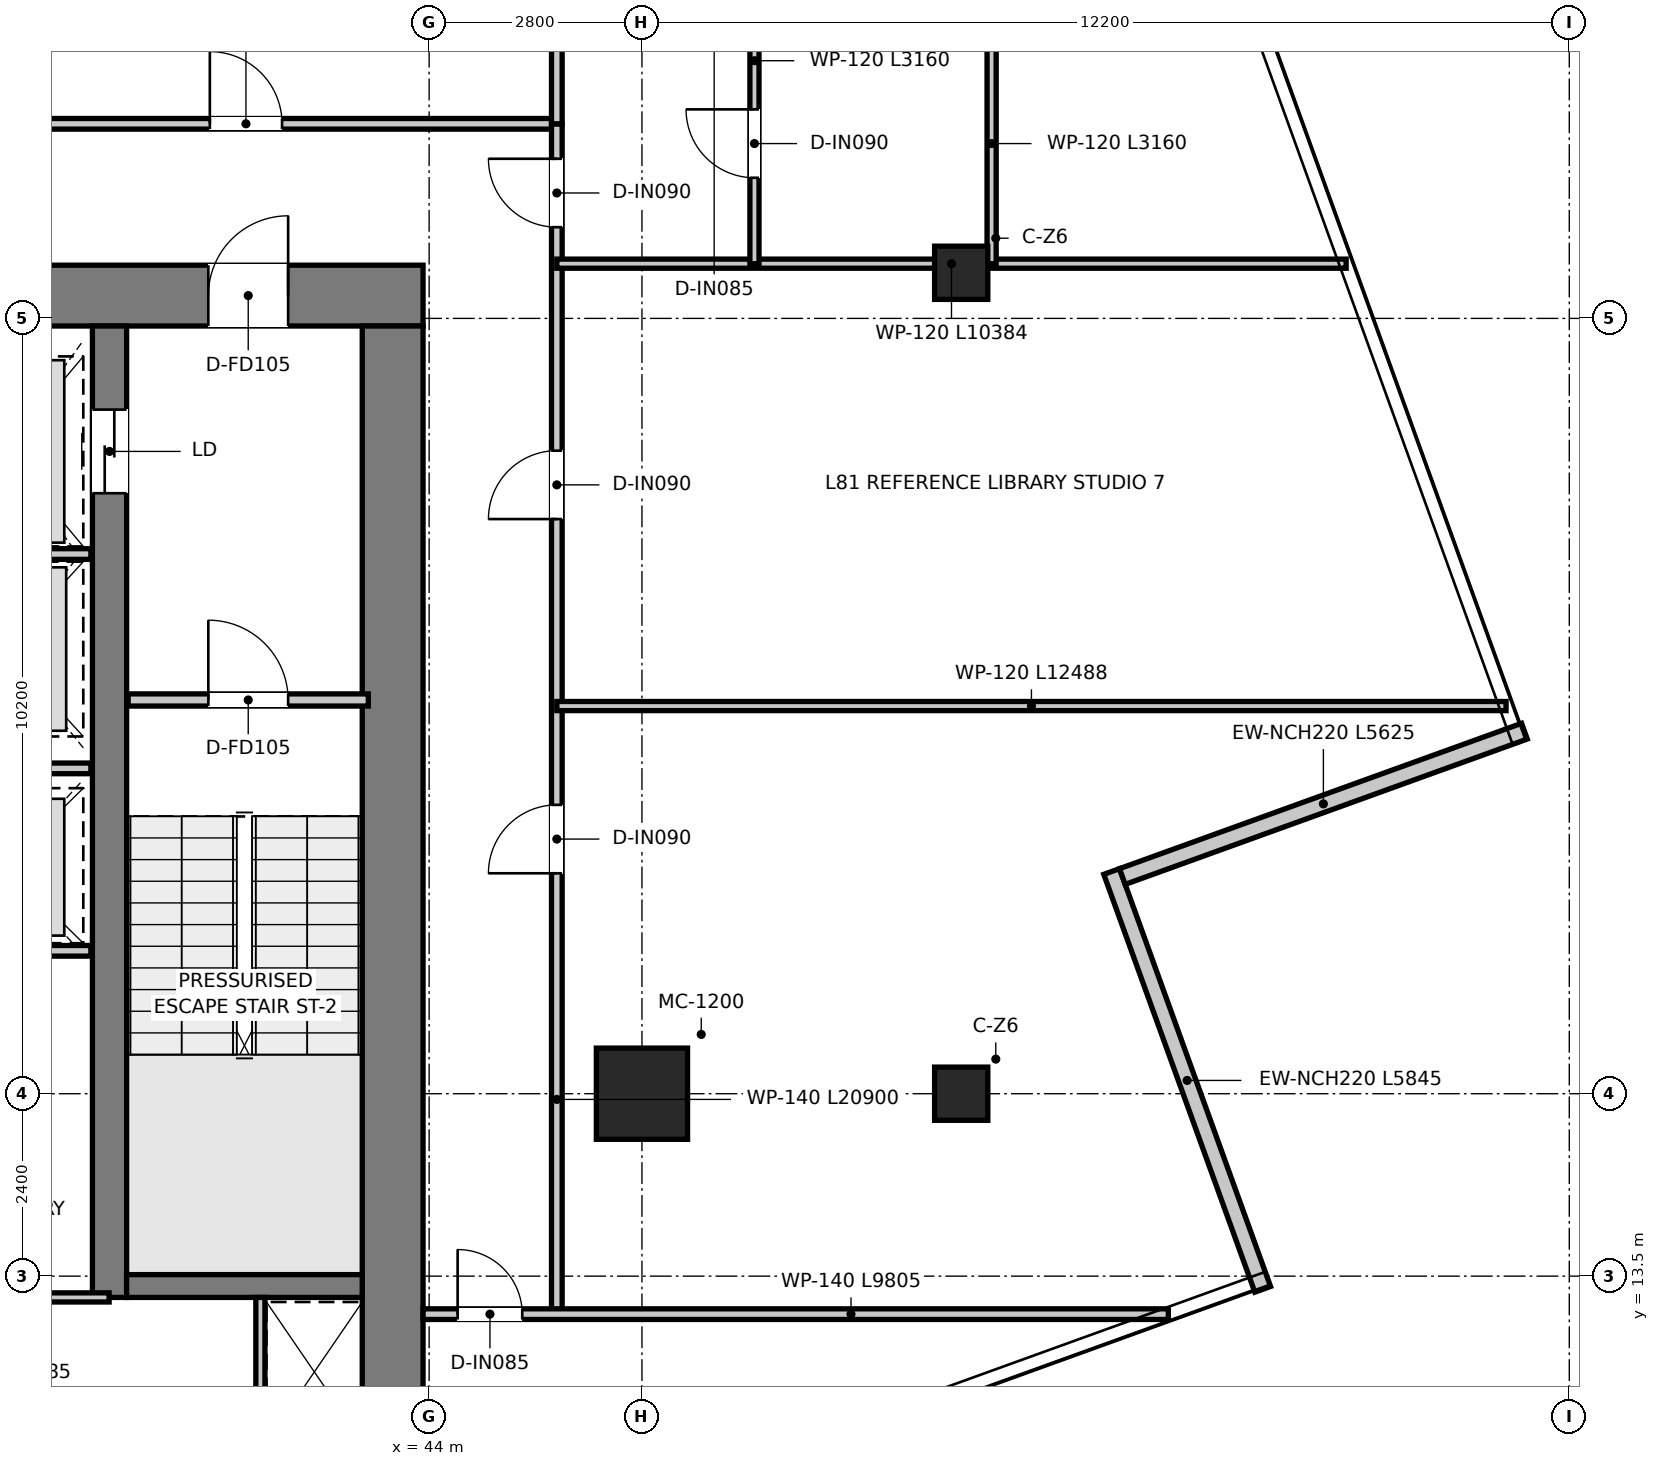
"""IFC4 building model, lengths in metres.
Left out: names, types, materials, properties, quantities, classifications, styles, units other than length and angle.
Written with IfcOpenShell. Run it as: python <this file> out.ifc"""

import sys

from ifc_helpers import new_model, si_unit, direction, frame, frame_2d, origin, origin_2d, place, context, subcontext, project, spatial, rectangle, extrude, source, transform, mapped, element, fill, save


model = new_model("IFC4")
c1 = context("Model", 3, precision=1e-05, world=origin(), true_north=direction((0.0, 1.0)))
c2 = subcontext(c1, "Body", "Model", "MODEL_VIEW")
j1 = project(units=[si_unit("LENGTHUNIT", "METRE"), si_unit("PLANEANGLEUNIT", "RADIAN")], contexts=[c1])
p1 = place(None, origin())
s1 = spatial("IfcSite", under=j1, at=p1, CompositionType="ELEMENT")
p2 = place(p1, origin())
s2 = spatial("IfcBuilding", under=s1, at=p2, CompositionType="ELEMENT")
p3 = place(p2, frame((0.0, 0.0, 331.65)))
s3 = spatial("IfcBuildingStorey", under=s2, at=p3, CompositionType="ELEMENT", Elevation=331.65)
p4 = place(p3, frame((28.08, 26.4, 0.0), z_axis=(0.0, 0.0, 1.0), x_axis=(1.0, 0.0, 0.0)))
e1 = element("IfcWall", 1, at=p4, inside=s3, PredefinedType="SHEAR", context=c2, shape_type="SweptSolid", body=[
    extrude(rectangle(XDim=15.84, YDim=0.8, at=frame_2d((7.92, 0.0))), origin(), (0.0, 0.0, 1.0), 3.95),
])
p5 = place(p4, frame((7.22, 0.0, 0.0)))
e2 = element("IfcOpeningElement", 2, at=p5, cuts=e1, PredefinedType="OPENING", context=c2, shape_type="SweptSolid", body=[
    extrude(rectangle(XDim=1.4, YDim=2.2, at=frame_2d((0.7, 1.1))), frame((0.0, 0.41, 0.0), z_axis=(0.0, -1.0, 0.0), x_axis=(1.0, 0.0, 0.0)), (0.0, 0.0, 1.0), 0.82),
])
p6 = place(p4, frame((1.775, 0.0, 0.0)))
e3 = element("IfcOpeningElement", 3, at=p6, cuts=e1, PredefinedType="OPENING", context=c2, shape_type="SweptSolid", body=[
    extrude(rectangle(XDim=1.05, YDim=2.1, at=frame_2d((0.525, 1.05))), frame((0.0, 0.41, 0.0), z_axis=(0.0, -1.0, 0.0), x_axis=(1.0, 0.0, 0.0)), (0.0, 0.0, 1.0), 0.82),
])
p7 = place(p4, frame((13.015, 0.0, 0.0)))
e4 = element("IfcOpeningElement", 4, at=p7, cuts=e1, PredefinedType="OPENING", context=c2, shape_type="SweptSolid", body=[
    extrude(rectangle(XDim=1.05, YDim=2.1, at=frame_2d((0.525, 1.05))), frame((0.0, 0.41, 0.0), z_axis=(0.0, -1.0, 0.0), x_axis=(1.0, 0.0, 0.0)), (0.0, 0.0, 1.0), 0.82),
])
p8 = place(p3, frame((43.52, 11.3, 0.0), z_axis=(0.0, 0.0, 1.0), x_axis=(0.0, 1.0, 0.0)))
e5 = element("IfcWall", 5, at=p8, inside=s3, PredefinedType="SHEAR", context=c2, shape_type="SweptSolid", body=[
    extrude(rectangle(XDim=14.7, YDim=0.8, at=frame_2d((7.35, 0.0))), origin(), (0.0, 0.0, 1.0), 3.95),
])
p9 = place(p3, frame((39.795, 13.22, 0.0), z_axis=(0.0, 0.0, 1.0), x_axis=(0.0, 1.0, 0.0)))
e6 = element("IfcWall", 6, at=p9, inside=s3, PredefinedType="SHEAR", context=c2, shape_type="SweptSolid", body=[
    extrude(rectangle(XDim=12.78, YDim=0.45, at=frame_2d((6.39, 0.0))), origin(), (0.0, 0.0, 1.0), 3.95),
])
p10 = place(p9, frame((10.58, 0.0, 0.0)))
e7 = element("IfcOpeningElement", 7, at=p10, cuts=e6, PredefinedType="OPENING", context=c2, shape_type="SweptSolid", body=[
    extrude(rectangle(XDim=1.1, YDim=2.15, at=frame_2d((0.55, 1.075))), frame((0.0, 0.235, 0.0), z_axis=(0.0, -1.0, 0.0), x_axis=(1.0, 0.0, 0.0)), (0.0, 0.0, 1.0), 0.47),
])
p11 = place(p3, frame((40.02, 13.37, 0.0), z_axis=(0.0, 0.0, 1.0), x_axis=(1.0, 0.0, 0.0)))
e8 = element("IfcWall", 8, at=p11, inside=s3, PredefinedType="SHEAR", context=c2, shape_type="SweptSolid", body=[
    extrude(rectangle(XDim=3.1, YDim=0.3, at=frame_2d((1.55, 0.0))), origin(), (0.0, 0.0, 1.0), 3.95),
])
m1 = source(origin(), c2, "Body", "SweptSolid", [
    extrude(rectangle(XDim=1.2, YDim=1.2, at=origin_2d()), origin(), (0.0, 0.0, 1.0), 3.95),
])
p12 = place(p3, frame((46.8, 15.9, 0.0), z_axis=(0.0, 0.0, 1.0), x_axis=(1.0, 0.0, 0.0)))
e9 = element("IfcColumn", 9, at=p12, inside=s3, PredefinedType="USERDEFINED", context=c2, shape_type="MappedRepresentation", body=[
    mapped(m1, transform((0.0, 0.0, 0.0), x_axis=(1.0, 0.0, 0.0), y_axis=(0.0, 1.0, 0.0), z_axis=(0.0, 0.0, 1.0), scale=1.0)),
])
m2 = source(origin(), c2, "Body", "SweptSolid", [
    extrude(rectangle(XDim=0.7, YDim=0.7, at=origin_2d()), origin(), (0.0, 0.0, 1.0), 3.95),
])
for number, where, z_axis, x_axis in (
    (10, (51.0, 26.7, 0.0), (0.0, 0.0, 1.0), (1.0, 0.0, 0.0)),
    (11, (51.0, 15.9, 0.0), (0.0, 0.0, 1.0), (1.0, 0.0, 0.0)),
):
    element("IfcColumn", number, at=place(p3, frame(where, z_axis=z_axis, x_axis=x_axis)), inside=s3, PredefinedType="COLUMN", context=c2, shape_type="MappedRepresentation", body=[
        mapped(m2, transform((0.0, 0.0, 0.0), x_axis=(1.0, 0.0, 0.0), y_axis=(0.0, 1.0, 0.0), z_axis=(0.0, 0.0, 1.0), scale=1.0)),
    ])
p13 = place(p3, frame((54.966, 13.326, 0.0), z_axis=(0.0, 0.0, 1.0), x_axis=(-0.339961607222, 0.940439315222, 0.0)))
e12 = element("IfcWall", 12, at=p13, inside=s3, PredefinedType="ELEMENTEDWALL", context=c2, shape_type="SweptSolid", body=[
    extrude(rectangle(XDim=5.845, YDim=0.22, at=frame_2d((2.922, 0.0))), origin(), (0.0, 0.0, 1.0), 3.67),
])
p14 = place(p3, frame((53.12, 18.757, 0.0), z_axis=(0.0, 0.0, 1.0), x_axis=(0.940431745156, 0.339982547644, 0.0)))
e13 = element("IfcWall", 13, at=p14, inside=s3, PredefinedType="ELEMENTEDWALL", context=c2, shape_type="SweptSolid", body=[
    extrude(rectangle(XDim=5.625, YDim=0.22, at=frame_2d((2.812, 0.0))), origin(), (0.0, 0.0, 1.0), 3.67),
])
p15 = place(p3, frame((40.04, 21.08, 0.0), z_axis=(0.0, 0.0, 1.0), x_axis=(1.0, 0.0, 0.0)))
e14 = element("IfcWall", 14, at=p15, inside=s3, PredefinedType="PARTITIONING", context=c2, shape_type="SweptSolid", body=[
    extrude(rectangle(XDim=3.16, YDim=0.16, at=frame_2d((1.58, 0.0))), origin(), (0.0, 0.0, 1.0), 3.67),
])
p16 = place(p15, frame((1.055, 0.0, 0.0)))
e15 = element("IfcOpeningElement", 15, at=p16, cuts=e14, PredefinedType="OPENING", context=c2, shape_type="SweptSolid", body=[
    extrude(rectangle(XDim=1.05, YDim=2.1, at=frame_2d((0.525, 1.05))), frame((0.0, 0.09, 0.0), z_axis=(0.0, -1.0, 0.0), x_axis=(1.0, 0.0, 0.0)), (0.0, 0.0, 1.0), 0.18),
])
p17 = place(p3, frame((37.28, 23.0, 0.0), z_axis=(0.0, 0.0, 1.0), x_axis=(1.0, 0.0, 0.0)))
e16 = element("IfcWall", 16, at=p17, inside=s3, PredefinedType="PARTITIONING", context=c2, shape_type="SweptSolid", body=[
    extrude(rectangle(XDim=2.27, YDim=0.14, at=frame_2d((1.135, 0.0))), origin(), (0.0, 0.0, 1.0), 2.82),
])
for number, where, z_axis, x_axis in (
    (17, (37.28, 17.78, 0.0), (0.0, 0.0, 1.0), (1.0, 0.0, 0.0)),
    (18, (37.28, 20.18, 0.0), (0.0, 0.0, 1.0), (1.0, 0.0, 0.0)),
):
    element("IfcWall", number, at=place(p3, frame(where, z_axis=z_axis, x_axis=x_axis)), inside=s3, PredefinedType="PARTITIONING", context=c2, shape_type="SweptSolid", body=[
        extrude(rectangle(XDim=2.27, YDim=0.14, at=frame_2d((1.135, 0.0))), origin(), (0.0, 0.0, 1.0), 3.67),
    ])
p18 = place(p3, frame((41.78, 11.25, 0.0), z_axis=(0.0, 0.0, 1.0), x_axis=(0.0, 1.0, 0.0)))
e19 = element("IfcWall", 19, at=p18, inside=s3, PredefinedType="PARTITIONING", context=c2, shape_type="SweptSolid", body=[
    extrude(rectangle(XDim=1.97, YDim=0.12, at=frame_2d((0.985, 0.0))), origin(), (0.0, 0.0, 1.0), 3.67),
])
p19 = place(p3, frame((32.21, 13.22, 0.0), z_axis=(0.0, 0.0, 1.0), x_axis=(1.0, 0.0, 0.0)))
e20 = element("IfcWall", 20, at=p19, inside=s3, PredefinedType="PARTITIONING", context=c2, shape_type="SweptSolid", body=[
    extrude(rectangle(XDim=7.58, YDim=0.12, at=frame_2d((3.79, 0.0))), origin(), (0.0, 0.0, 1.0), 3.67),
])
p20 = place(p19, frame((3.365, 0.0, 0.0)))
e21 = element("IfcOpeningElement", 21, at=p20, cuts=e20, PredefinedType="OPENING", context=c2, shape_type="SweptSolid", body=[
    extrude(rectangle(XDim=0.85, YDim=2.1, at=frame_2d((0.425, 1.05))), frame((0.0, 0.07, 0.0), z_axis=(0.0, -1.0, 0.0), x_axis=(1.0, 0.0, 0.0)), (0.0, 0.0, 1.0), 0.14),
])
p21 = place(p3, frame((26.32, 28.66, 0.0), z_axis=(0.0, 0.0, 1.0), x_axis=(1.0, 0.0, 0.0)))
e22 = element("IfcWall", 22, at=p21, inside=s3, PredefinedType="PARTITIONING", context=c2, shape_type="SweptSolid", body=[
    extrude(rectangle(XDim=19.36, YDim=0.14, at=frame_2d((9.68, 0.0))), origin(), (0.0, 0.0, 1.0), 3.18),
])
p22 = place(p21, frame((5.115, 0.0, 0.0)))
e23 = element("IfcOpeningElement", 23, at=p22, cuts=e22, PredefinedType="OPENING", context=c2, shape_type="SweptSolid", body=[
    extrude(rectangle(XDim=0.95, YDim=2.1, at=frame_2d((0.475, 1.05))), frame((0.0, 0.08, 0.0), z_axis=(0.0, -1.0, 0.0), x_axis=(1.0, 0.0, 0.0)), (0.0, 0.0, 1.0), 0.16),
])
p23 = place(p21, frame((14.795, 0.0, 0.0)))
e24 = element("IfcOpeningElement", 24, at=p23, cuts=e22, PredefinedType="OPENING", context=c2, shape_type="SweptSolid", body=[
    extrude(rectangle(XDim=0.95, YDim=2.1, at=frame_2d((0.475, 1.05))), frame((0.0, 0.08, 0.0), z_axis=(0.0, -1.0, 0.0), x_axis=(1.0, 0.0, 0.0)), (0.0, 0.0, 1.0), 0.16),
])
p24 = place(p3, frame((45.68, 13.0, 0.0), z_axis=(0.0, 0.0, 1.0), x_axis=(0.0, 1.0, 0.0)))
e25 = element("IfcWall", 25, at=p24, inside=s3, PredefinedType="PARTITIONING", context=c2, shape_type="SweptSolid", body=[
    extrude(rectangle(XDim=15.66, YDim=0.14, at=frame_2d((7.83, 0.0))), origin(), (0.0, 0.0, 1.0), 3.13),
])
p25 = place(p24, frame((14.3, 0.0, 0.0)))
e26 = element("IfcOpeningElement", 26, at=p25, cuts=e25, PredefinedType="OPENING", context=c2, shape_type="SweptSolid", body=[
    extrude(rectangle(XDim=0.9, YDim=2.1, at=frame_2d((0.45, 1.05))), frame((0.0, 0.08, 0.0), z_axis=(0.0, -1.0, 0.0), x_axis=(1.0, 0.0, 0.0)), (0.0, 0.0, 1.0), 0.16),
])
p26 = place(p24, frame((5.8, 0.0, 0.0)))
e27 = element("IfcOpeningElement", 27, at=p26, cuts=e25, PredefinedType="OPENING", context=c2, shape_type="SweptSolid", body=[
    extrude(rectangle(XDim=0.9, YDim=2.1, at=frame_2d((0.45, 1.05))), frame((0.0, 0.08, 0.0), z_axis=(0.0, -1.0, 0.0), x_axis=(1.0, 0.0, 0.0)), (0.0, 0.0, 1.0), 0.16),
])
p27 = place(p24, frame((10.46, 0.0, 0.0)))
e28 = element("IfcOpeningElement", 28, at=p27, cuts=e25, PredefinedType="OPENING", context=c2, shape_type="SweptSolid", body=[
    extrude(rectangle(XDim=0.9, YDim=2.1, at=frame_2d((0.45, 1.05))), frame((0.0, 0.08, 0.0), z_axis=(0.0, -1.0, 0.0), x_axis=(1.0, 0.0, 0.0)), (0.0, 0.0, 1.0), 0.16),
])
p28 = place(p3, frame((43.92, 13.0, 0.0), z_axis=(0.0, 0.0, 1.0), x_axis=(1.0, 0.0, 0.0)))
e29 = element("IfcWall", 29, at=p28, inside=s3, PredefinedType="PARTITIONING", context=c2, shape_type="SweptSolid", body=[
    extrude(rectangle(XDim=9.805, YDim=0.14, at=frame_2d((4.903, 0.0))), origin(), (0.0, 0.0, 1.0), 3.18),
])
p29 = place(p28, frame((0.455, 0.0, 0.0)))
e30 = element("IfcOpeningElement", 30, at=p29, cuts=e29, PredefinedType="OPENING", context=c2, shape_type="SweptSolid", body=[
    extrude(rectangle(XDim=0.85, YDim=2.1, at=frame_2d((0.425, 1.05))), frame((0.0, 0.08, 0.0), z_axis=(0.0, -1.0, 0.0), x_axis=(1.0, 0.0, 0.0)), (0.0, 0.0, 1.0), 0.16),
])
p30 = place(p3, frame((45.68, 26.82, 0.0), z_axis=(0.0, 0.0, 1.0), x_axis=(1.0, 0.0, 0.0)))
e31 = element("IfcWall", 31, at=p30, inside=s3, PredefinedType="PARTITIONING", context=c2, shape_type="SweptSolid", body=[
    extrude(rectangle(XDim=10.384, YDim=0.12, at=frame_2d((5.192, 0.0))), origin(), (0.0, 0.0, 1.0), 3.13),
])
p31 = place(p3, frame((51.4, 26.82, 0.0), z_axis=(0.0, 0.0, 1.0), x_axis=(0.0, 1.0, 0.0)))
e32 = element("IfcWall", 32, at=p31, inside=s3, PredefinedType="PARTITIONING", context=c2, shape_type="SweptSolid", body=[
    extrude(rectangle(XDim=3.16, YDim=0.12, at=frame_2d((1.58, 0.0))), origin(), (0.0, 0.0, 1.0), 3.67),
])
p32 = place(p3, frame((48.28, 26.82, 0.0), z_axis=(0.0, 0.0, 1.0), x_axis=(0.0, 1.0, 0.0)))
e33 = element("IfcWall", 33, at=p32, inside=s3, PredefinedType="PARTITIONING", context=c2, shape_type="SweptSolid", body=[
    extrude(rectangle(XDim=3.16, YDim=0.12, at=frame_2d((1.58, 0.0))), origin(), (0.0, 0.0, 1.0), 3.18),
])
p33 = place(p32, frame((1.13, 0.0, 0.0)))
e34 = element("IfcOpeningElement", 34, at=p33, cuts=e33, PredefinedType="OPENING", context=c2, shape_type="SweptSolid", body=[
    extrude(rectangle(XDim=0.9, YDim=2.1, at=frame_2d((0.45, 1.05))), frame((0.0, 0.07, 0.0), z_axis=(0.0, -1.0, 0.0), x_axis=(1.0, 0.0, 0.0)), (0.0, 0.0, 1.0), 0.14),
])
p34 = place(p3, frame((45.68, 28.66, 0.0), z_axis=(0.0, 0.0, 1.0), x_axis=(0.0, 1.0, 0.0)))
e35 = element("IfcWall", 35, at=p34, inside=s3, PredefinedType="PARTITIONING", context=c2, shape_type="SweptSolid", body=[
    extrude(rectangle(XDim=5.24, YDim=0.14, at=frame_2d((2.62, 0.0))), origin(), (0.0, 0.0, 1.0), 3.43),
])
p35 = place(p3, frame((45.68, 21.0, 0.0), z_axis=(0.0, 0.0, 1.0), x_axis=(1.0, 0.0, 0.0)))
e36 = element("IfcWall", 36, at=p35, inside=s3, PredefinedType="PARTITIONING", context=c2, shape_type="SweptSolid", body=[
    extrude(rectangle(XDim=12.488, YDim=0.12, at=frame_2d((6.244, 0.0))), origin(), (0.0, 0.0, 1.0), 3.13),
])
p36 = place(p16, origin())
e37 = element("IfcDoor", 37, at=p36, inside=s3, OperationType="SINGLE_SWING_LEFT", PredefinedType="DOOR", context=c2, shape_type="SweptSolid", body=[
    extrude(rectangle(XDim=1.05, YDim=2.1, at=frame_2d((0.525, 1.05))), frame((0.0, 0.025, 0.0), z_axis=(0.0, -1.0, 0.0), x_axis=(1.0, 0.0, 0.0)), (0.0, 0.0, 1.0), 0.05),
])
fill(e15, e37)
p37 = place(p7, origin())
e38 = element("IfcDoor", 38, at=p37, inside=s3, OperationType="SINGLE_SWING_RIGHT", PredefinedType="DOOR", context=c2, shape_type="SweptSolid", body=[
    extrude(rectangle(XDim=1.05, YDim=2.1, at=frame_2d((0.525, 1.05))), frame((0.0, 0.025, 0.0), z_axis=(0.0, -1.0, 0.0), x_axis=(1.0, 0.0, 0.0)), (0.0, 0.0, 1.0), 0.05),
])
fill(e4, e38)
p38 = place(p10, origin())
e39 = element("IfcDoor", 39, at=p38, inside=s3, OperationType="DOUBLE_DOOR_SLIDING", PredefinedType="DOOR", context=c2, shape_type="SweptSolid", body=[
    extrude(rectangle(XDim=1.1, YDim=2.15, at=frame_2d((0.55, 1.075))), frame((0.0, 0.025, 0.0), z_axis=(0.0, -1.0, 0.0), x_axis=(1.0, 0.0, 0.0)), (0.0, 0.0, 1.0), 0.05),
])
fill(e7, e39)
p39 = place(p25, origin())
e40 = element("IfcDoor", 40, at=p39, inside=s3, OperationType="SINGLE_SWING_RIGHT", PredefinedType="DOOR", context=c2, shape_type="SweptSolid", body=[
    extrude(rectangle(XDim=0.9, YDim=2.1, at=frame_2d((0.45, 1.05))), frame((0.0, 0.025, 0.0), z_axis=(0.0, -1.0, 0.0), x_axis=(1.0, 0.0, 0.0)), (0.0, 0.0, 1.0), 0.05),
])
fill(e26, e40)
p40 = place(p33, origin())
e41 = element("IfcDoor", 41, at=p40, inside=s3, OperationType="SINGLE_SWING_RIGHT", PredefinedType="DOOR", context=c2, shape_type="SweptSolid", body=[
    extrude(rectangle(XDim=0.9, YDim=2.1, at=frame_2d((0.45, 1.05))), frame((0.0, 0.025, 0.0), z_axis=(0.0, -1.0, 0.0), x_axis=(1.0, 0.0, 0.0)), (0.0, 0.0, 1.0), 0.05),
])
fill(e34, e41)
p41 = place(p23, origin())
e42 = element("IfcDoor", 42, at=p41, inside=s3, OperationType="SINGLE_SWING_LEFT", PredefinedType="DOOR", context=c2, shape_type="SweptSolid", body=[
    extrude(rectangle(XDim=0.95, YDim=2.1, at=frame_2d((0.475, 1.05))), frame((0.0, 0.025, 0.0), z_axis=(0.0, -1.0, 0.0), x_axis=(1.0, 0.0, 0.0)), (0.0, 0.0, 1.0), 0.05),
])
fill(e24, e42)
p42 = place(p26, origin())
e43 = element("IfcDoor", 43, at=p42, inside=s3, OperationType="SINGLE_SWING_LEFT", PredefinedType="DOOR", context=c2, shape_type="SweptSolid", body=[
    extrude(rectangle(XDim=0.9, YDim=2.1, at=frame_2d((0.45, 1.05))), frame((0.0, 0.025, 0.0), z_axis=(0.0, -1.0, 0.0), x_axis=(1.0, 0.0, 0.0)), (0.0, 0.0, 1.0), 0.05),
])
fill(e27, e43)
p43 = place(p27, origin())
e44 = element("IfcDoor", 44, at=p43, inside=s3, OperationType="SINGLE_SWING_LEFT", PredefinedType="DOOR", context=c2, shape_type="SweptSolid", body=[
    extrude(rectangle(XDim=0.9, YDim=2.1, at=frame_2d((0.45, 1.05))), frame((0.0, 0.025, 0.0), z_axis=(0.0, -1.0, 0.0), x_axis=(1.0, 0.0, 0.0)), (0.0, 0.0, 1.0), 0.05),
])
fill(e28, e44)
p44 = place(p29, origin())
e45 = element("IfcDoor", 45, at=p44, inside=s3, OperationType="SINGLE_SWING_LEFT", PredefinedType="DOOR", context=c2, shape_type="SweptSolid", body=[
    extrude(rectangle(XDim=0.85, YDim=2.1, at=frame_2d((0.425, 1.05))), frame((0.0, 0.025, 0.0), z_axis=(0.0, -1.0, 0.0), x_axis=(1.0, 0.0, 0.0)), (0.0, 0.0, 1.0), 0.05),
])
fill(e30, e45)
save(model, sys.argv[1])
